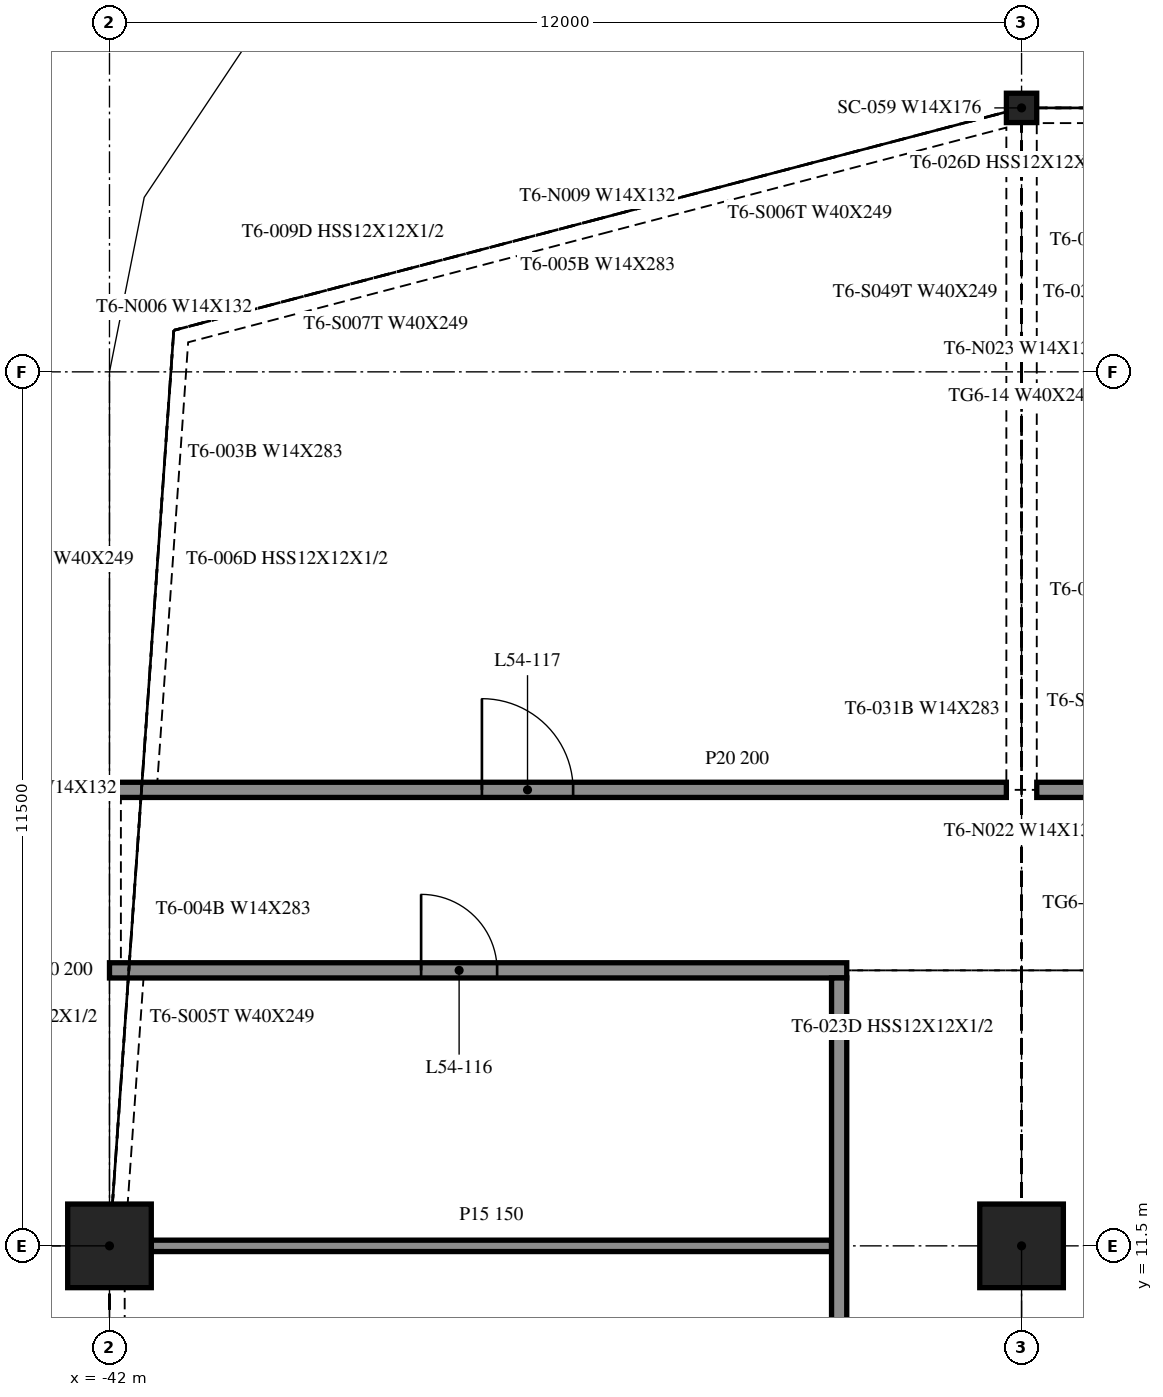
"""IFC4 building model, lengths in metres.
Left out: names, types, materials, properties, quantities, classifications, styles, units other than length and angle.
Written with IfcOpenShell. Run it as: python <this file> out.ifc"""

import sys

from ifc_helpers import new_model, si_unit, direction, frame, frame_2d, origin, origin_2d, place, context, subcontext, project, spatial, rectangle, i_section, extrude, element, fill, save


model = new_model("IFC4")
c1 = context("Model", 3, precision=1e-05, world=origin(), true_north=direction((0.0, 1.0)))
c2 = subcontext(c1, "Body", "Model", "MODEL_VIEW")
j1 = project(units=[si_unit("LENGTHUNIT", "METRE"), si_unit("PLANEANGLEUNIT", "RADIAN")], contexts=[c1])
p1 = place(None, origin())
s1 = spatial("IfcSite", under=j1, at=p1, CompositionType="ELEMENT")
p2 = place(p1, origin())
s2 = spatial("IfcBuilding", under=s1, at=p2, CompositionType="ELEMENT")
p3 = place(p2, frame((0.0, 0.0, 224.3)))
s3 = spatial("IfcBuildingStorey", under=s2, at=p3, CompositionType="ELEMENT", Elevation=224.3)
for number, where, z_axis, x_axis in (
    (1, (-42.0, 11.5, -0.4), (0.0, 0.0, 1.0), (1.0, 0.0, 0.0)),
    (2, (-30.0, 11.5, -0.4), (0.0, 0.0, 1.0), (1.0, 0.0, 0.0)),
):
    element("IfcColumn", number, at=place(p3, frame(where, z_axis=z_axis, x_axis=x_axis)), inside=s3, PredefinedType="COLUMN", context=c2, shape_type="SweptSolid", body=[
        extrude(rectangle(XDim=1.1, YDim=1.1, at=origin_2d()), origin(), (0.0, 0.0, 1.0), 4.36),
    ])
p4 = place(p3, frame((-30.0, 26.473, -0.4), z_axis=(0.0, 0.0, 1.0), x_axis=(1.0, 0.0, 0.0)))
e3 = element("IfcColumn", 3, at=p4, inside=s3, PredefinedType="COLUMN", context=c2, shape_type="SweptSolid", body=[
    extrude(i_section(OverallWidth=0.399, OverallDepth=0.386, WebThickness=0.021, FlangeThickness=0.033, at=origin_2d()), origin(), (0.0, 0.0, 1.0), 4.36),
])
p5 = place(p3, frame((-41.45, 11.5, 0.0), z_axis=(0.0, 0.0, 1.0), x_axis=(1.0, 0.0, 0.0)))
e4 = element("IfcWall", 4, at=p5, inside=s3, PredefinedType="PARTITIONING", context=c2, shape_type="SweptSolid", body=[
    extrude(rectangle(XDim=8.95, YDim=0.15, at=frame_2d((4.475, 0.0))), origin(), (0.0, 0.0, 1.0), 3.96),
])
p6 = place(p3, frame((-42.0, 15.125, 0.0), z_axis=(0.0, 0.0, 1.0), x_axis=(1.0, 0.0, 0.0)))
e5 = element("IfcWall", 5, at=p6, inside=s3, PredefinedType="PARTITIONING", context=c2, shape_type="SweptSolid", body=[
    extrude(rectangle(XDim=9.7, YDim=0.2, at=frame_2d((4.85, 0.0))), origin(), (0.0, 0.0, 1.0), 3.96),
])
p7 = place(p6, frame((4.1, 0.0, 0.0)))
e6 = element("IfcOpeningElement", 6, at=p7, cuts=e5, PredefinedType="OPENING", context=c2, shape_type="SweptSolid", body=[
    extrude(rectangle(XDim=1.0, YDim=2.1, at=frame_2d((0.5, 1.05))), frame((0.0, 0.11, 0.0), z_axis=(0.0, -1.0, 0.0), x_axis=(1.0, 0.0, 0.0)), (0.0, 0.0, 1.0), 0.22),
])
p8 = place(p3, frame((-42.0, 17.5, 0.0), z_axis=(0.0, 0.0, 1.0), x_axis=(1.0, 0.0, 0.0)))
e7 = element("IfcWall", 7, at=p8, inside=s3, PredefinedType="PARTITIONING", context=c2, shape_type="SweptSolid", body=[
    extrude(rectangle(XDim=11.8, YDim=0.2, at=frame_2d((5.9, 0.0))), origin(), (0.0, 0.0, 1.0), 3.96),
])
p9 = place(p8, frame((4.9, 0.0, 0.0)))
e8 = element("IfcOpeningElement", 8, at=p9, cuts=e7, PredefinedType="OPENING", context=c2, shape_type="SweptSolid", body=[
    extrude(rectangle(XDim=1.2, YDim=2.1, at=frame_2d((0.6, 1.05))), frame((0.0, 0.11, 0.0), z_axis=(0.0, -1.0, 0.0), x_axis=(1.0, 0.0, 0.0)), (0.0, 0.0, 1.0), 0.22),
])
p10 = place(p3, frame((-29.8, 17.5, 0.0), z_axis=(0.0, 0.0, 1.0), x_axis=(1.0, 0.0, 0.0)))
e9 = element("IfcWall", 9, at=p10, inside=s3, PredefinedType="PARTITIONING", context=c2, shape_type="SweptSolid", body=[
    extrude(rectangle(XDim=11.6, YDim=0.2, at=frame_2d((5.8, 0.0))), origin(), (0.0, 0.0, 1.0), 3.96),
])
p11 = place(p10, frame((5.3, 0.0, 0.0)))
e10 = element("IfcOpeningElement", 10, at=p11, cuts=e9, PredefinedType="OPENING", context=c2, shape_type="SweptSolid", body=[
    extrude(rectangle(XDim=1.0, YDim=2.1, at=frame_2d((0.5, 1.05))), frame((0.0, 0.11, 0.0), z_axis=(0.0, -1.0, 0.0), x_axis=(1.0, 0.0, 0.0)), (0.0, 0.0, 1.0), 0.22),
])
p12 = place(p3, frame((-32.4, -9.025, 0.0), z_axis=(0.0, 0.0, 1.0), x_axis=(0.0, 1.0, 0.0)))
e11 = element("IfcWall", 11, at=p12, inside=s3, PredefinedType="PARTITIONING", context=c2, shape_type="SweptSolid", body=[
    extrude(rectangle(XDim=24.05, YDim=0.2, at=frame_2d((12.025, 0.0))), origin(), (0.0, 0.0, 1.0), 3.96),
])
p13 = place(p12, frame((11.5, 0.0, 0.0)))
e12 = element("IfcOpeningElement", 12, at=p13, cuts=e11, PredefinedType="OPENING", context=c2, shape_type="SweptSolid", body=[
    extrude(rectangle(XDim=1.2, YDim=2.1, at=frame_2d((0.6, 1.05))), frame((0.0, 0.11, 0.0), z_axis=(0.0, -1.0, 0.0), x_axis=(1.0, 0.0, 0.0)), (0.0, 0.0, 1.0), 0.22),
])
p14 = place(p7, origin())
e13 = element("IfcDoor", 13, at=p14, inside=s3, OperationType="SINGLE_SWING_RIGHT", PredefinedType="DOOR", context=c2, shape_type="SweptSolid", body=[
    extrude(rectangle(XDim=1.0, YDim=2.1, at=frame_2d((0.5, 1.05))), frame((0.0, 0.025, 0.0), z_axis=(0.0, -1.0, 0.0), x_axis=(1.0, 0.0, 0.0)), (0.0, 0.0, 1.0), 0.05),
])
fill(e6, e13)
p15 = place(p9, origin())
e14 = element("IfcDoor", 14, at=p15, inside=s3, OperationType="SINGLE_SWING_LEFT", PredefinedType="DOOR", context=c2, shape_type="SweptSolid", body=[
    extrude(rectangle(XDim=1.2, YDim=2.1, at=frame_2d((0.6, 1.05))), frame((0.0, 0.025, 0.0), z_axis=(0.0, -1.0, 0.0), x_axis=(1.0, 0.0, 0.0)), (0.0, 0.0, 1.0), 0.05),
])
fill(e8, e14)
save(model, sys.argv[1])
